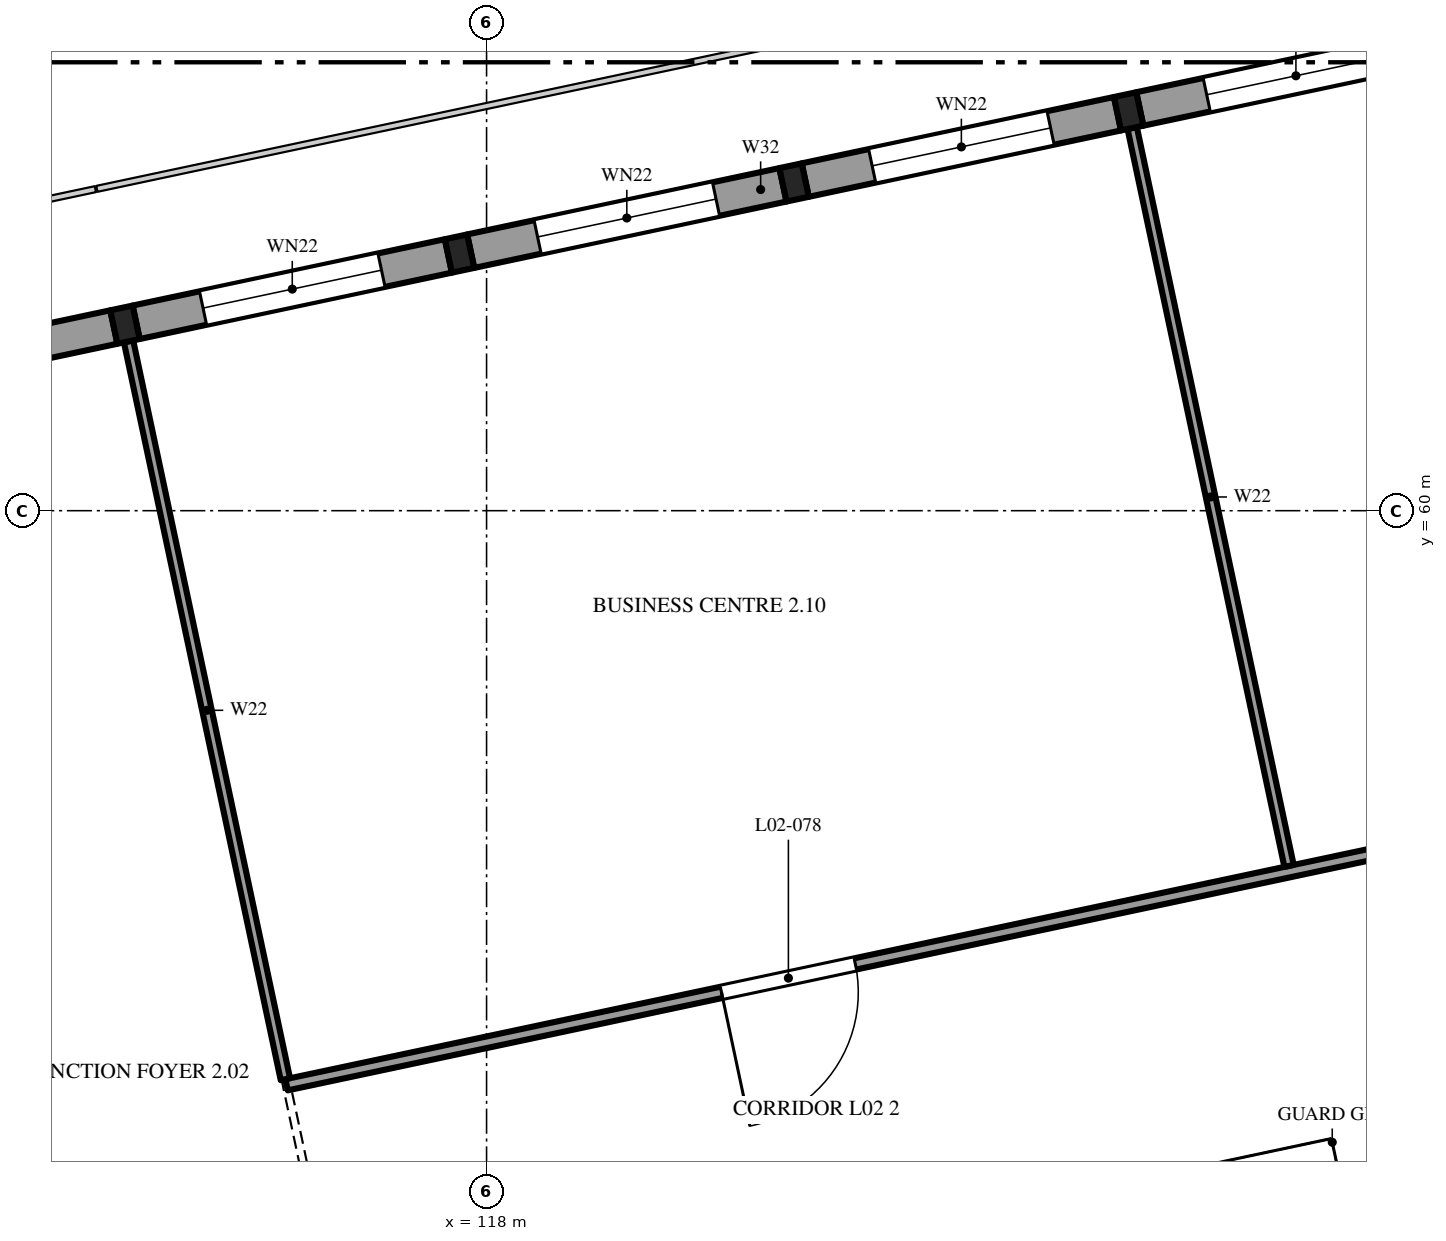
"""IFC4 building model, lengths in metres.
Left out: names, types, materials, properties, quantities, classifications, styles, units other than length and angle.
Written with IfcOpenShell. Run it as: python <this file> out.ifc"""

import sys

from ifc_helpers import new_model, si_unit, direction, frame, frame_2d, origin, origin_2d, place, context, subcontext, project, spatial, rectangle, i_section, extrude, element, fill, save


model = new_model("IFC4")
c1 = context("Model", 3, precision=1e-05, world=origin(), true_north=direction((0.0, 1.0)))
c2 = subcontext(c1, "Body", "Model", "MODEL_VIEW")
j1 = project(units=[si_unit("LENGTHUNIT", "METRE"), si_unit("PLANEANGLEUNIT", "RADIAN")], contexts=[c1])
p1 = place(None, origin())
s1 = spatial("IfcSite", under=j1, at=p1, CompositionType="ELEMENT")
p2 = place(p1, origin())
s2 = spatial("IfcBuilding", under=s1, at=p2, CompositionType="ELEMENT")
p3 = place(p2, frame((0.0, 0.0, 12.0)))
s3 = spatial("IfcBuildingStorey", under=s2, at=p3, CompositionType="ELEMENT", Elevation=12.0)
for number, where, z_axis, x_axis in (
    (1, (113.243, 62.448, 0.0), (0.0, 0.0, 1.0), (0.978, 0.208, 0.0)),
    (2, (117.645, 63.383, 0.0), (0.0, 0.0, 1.0), (0.978, 0.208, 0.0)),
    (3, (122.046, 64.319, 0.0), (0.0, 0.0, 1.0), (0.978, 0.208, 0.0)),
    (4, (126.448, 65.254, 0.0), (0.0, 0.0, 1.0), (0.978, 0.208, 0.0)),
):
    element("IfcColumn", number, at=place(p3, frame(where, z_axis=z_axis, x_axis=x_axis)), inside=s3, PredefinedType="COLUMN", context=c2, shape_type="SweptSolid", body=[
        extrude(i_section(OverallWidth=0.3, OverallDepth=0.45, WebThickness=0.014, FlangeThickness=0.026, FilletRadius=0.027, at=origin_2d()), origin(), (0.0, 0.0, 1.0), 4.8),
    ])
p4 = place(p3, frame((108.988, 61.543, 0.0), z_axis=(0.0, 0.0, 1.0), x_axis=(0.978143927149, 0.207928972925, 0.0)))
e5 = element("IfcWall", 5, at=p4, inside=s3, PredefinedType="SOLIDWALL", context=c2, shape_type="SweptSolid", body=[
    extrude(rectangle(XDim=4.2, YDim=0.45, at=frame_2d((2.1, 0.0))), origin(), (0.0, 0.0, 1.0), 4.35),
])
p5 = place(p4, frame((0.9, 0.0, 0.45)))
e6 = element("IfcOpeningElement", 6, at=p5, cuts=e5, PredefinedType="OPENING", context=c2, shape_type="SweptSolid", body=[
    extrude(rectangle(XDim=2.4, YDim=3.3, at=frame_2d((1.2, 1.65))), frame((0.0, 0.235, 0.0), z_axis=(0.0, -1.0, 0.0), x_axis=(1.0, 0.0, 0.0)), (0.0, 0.0, 1.0), 0.47),
])
p6 = place(p3, frame((113.389, 62.479, 0.0), z_axis=(0.0, 0.0, 1.0), x_axis=(0.978146440129, 0.207917150959, 0.0)))
e7 = element("IfcWall", 7, at=p6, inside=s3, PredefinedType="SOLIDWALL", context=c2, shape_type="SweptSolid", body=[
    extrude(rectangle(XDim=4.2, YDim=0.45, at=frame_2d((2.1, 0.0))), origin(), (0.0, 0.0, 1.0), 4.35),
])
p7 = place(p6, frame((0.9, 0.0, 0.9)))
e8 = element("IfcOpeningElement", 8, at=p7, cuts=e7, PredefinedType="OPENING", context=c2, shape_type="SweptSolid", body=[
    extrude(rectangle(XDim=2.4, YDim=2.4, at=frame_2d((1.2, 1.2))), frame((0.0, 0.235, 0.0), z_axis=(0.0, -1.0, 0.0), x_axis=(1.0, 0.0, 0.0)), (0.0, 0.0, 1.0), 0.47),
])
p8 = place(p3, frame((117.791, 63.414, 0.0), z_axis=(0.0, 0.0, 1.0), x_axis=(0.978146440129, 0.207917150959, 0.0)))
e9 = element("IfcWall", 9, at=p8, inside=s3, PredefinedType="SOLIDWALL", context=c2, shape_type="SweptSolid", body=[
    extrude(rectangle(XDim=4.2, YDim=0.45, at=frame_2d((2.1, 0.0))), origin(), (0.0, 0.0, 1.0), 4.35),
])
p9 = place(p8, frame((0.9, 0.0, 0.9)))
e10 = element("IfcOpeningElement", 10, at=p9, cuts=e9, PredefinedType="OPENING", context=c2, shape_type="SweptSolid", body=[
    extrude(rectangle(XDim=2.4, YDim=2.4, at=frame_2d((1.2, 1.2))), frame((0.0, 0.235, 0.0), z_axis=(0.0, -1.0, 0.0), x_axis=(1.0, 0.0, 0.0)), (0.0, 0.0, 1.0), 0.47),
])
p10 = place(p3, frame((122.193, 64.35, 0.0), z_axis=(0.0, 0.0, 1.0), x_axis=(0.978155748334, 0.207873355681, 0.0)))
e11 = element("IfcWall", 11, at=p10, inside=s3, PredefinedType="SOLIDWALL", context=c2, shape_type="SweptSolid", body=[
    extrude(rectangle(XDim=4.2, YDim=0.45, at=frame_2d((2.1, 0.0))), origin(), (0.0, 0.0, 1.0), 4.35),
])
p11 = place(p10, frame((0.9, 0.0, 0.9)))
e12 = element("IfcOpeningElement", 12, at=p11, cuts=e11, PredefinedType="OPENING", context=c2, shape_type="SweptSolid", body=[
    extrude(rectangle(XDim=2.4, YDim=2.4, at=frame_2d((1.2, 1.2))), frame((0.0, 0.235, 0.0), z_axis=(0.0, -1.0, 0.0), x_axis=(1.0, 0.0, 0.0)), (0.0, 0.0, 1.0), 0.47),
])
p12 = place(p3, frame((126.594, 65.286, 0.0), z_axis=(0.0, 0.0, 1.0), x_axis=(0.978143927149, 0.207928972925, 0.0)))
e13 = element("IfcWall", 13, at=p12, inside=s3, PredefinedType="SOLIDWALL", context=c2, shape_type="SweptSolid", body=[
    extrude(rectangle(XDim=4.2, YDim=0.45, at=frame_2d((2.1, 0.0))), origin(), (0.0, 0.0, 1.0), 4.35),
])
p13 = place(p12, frame((0.9, 0.0, 0.9)))
e14 = element("IfcOpeningElement", 14, at=p13, cuts=e13, PredefinedType="OPENING", context=c2, shape_type="SweptSolid", body=[
    extrude(rectangle(XDim=2.4, YDim=2.4, at=frame_2d((1.2, 1.2))), frame((0.0, 0.235, 0.0), z_axis=(0.0, -1.0, 0.0), x_axis=(1.0, 0.0, 0.0)), (0.0, 0.0, 1.0), 0.47),
])
p14 = place(p3, frame((115.369, 52.446, 0.0), z_axis=(0.0, 0.0, 1.0), x_axis=(0.978147028863, 0.207914381239, 0.0)))
e15 = element("IfcWall", 15, at=p14, inside=s3, PredefinedType="PARTITIONING", context=c2, shape_type="SweptSolid", body=[
    extrude(rectangle(XDim=49.5, YDim=0.15, at=frame_2d((24.75, 0.0))), origin(), (0.0, 0.0, 1.0), 3.75),
])
p15 = place(p14, frame((5.85, 0.0, 0.0)))
e16 = element("IfcOpeningElement", 16, at=p15, cuts=e15, PredefinedType="OPENING", context=c2, shape_type="SweptSolid", body=[
    extrude(rectangle(XDim=1.8, YDim=2.1, at=frame_2d((0.9, 1.05))), frame((0.0, 0.085, 0.0), z_axis=(0.0, -1.0, 0.0), x_axis=(1.0, 0.0, 0.0)), (0.0, 0.0, 1.0), 0.17),
])
p16 = place(p14, frame((19.35, 0.0, 0.0)))
e17 = element("IfcOpeningElement", 17, at=p16, cuts=e15, PredefinedType="OPENING", context=c2, shape_type="SweptSolid", body=[
    extrude(rectangle(XDim=1.8, YDim=2.1, at=frame_2d((0.9, 1.05))), frame((0.0, 0.085, 0.0), z_axis=(0.0, -1.0, 0.0), x_axis=(1.0, 0.0, 0.0)), (0.0, 0.0, 1.0), 0.17),
])
p17 = place(p14, frame((28.8, 0.0, 0.0)))
e18 = element("IfcOpeningElement", 18, at=p17, cuts=e15, PredefinedType="OPENING", context=c2, shape_type="SweptSolid", body=[
    extrude(rectangle(XDim=0.9, YDim=2.1, at=frame_2d((0.45, 1.05))), frame((0.0, 0.085, 0.0), z_axis=(0.0, -1.0, 0.0), x_axis=(1.0, 0.0, 0.0)), (0.0, 0.0, 1.0), 0.17),
])
p18 = place(p14, frame((33.25, 0.0, 0.0)))
e19 = element("IfcOpeningElement", 19, at=p18, cuts=e15, PredefinedType="OPENING", context=c2, shape_type="SweptSolid", body=[
    extrude(rectangle(XDim=1.0, YDim=2.1, at=frame_2d((0.5, 1.05))), frame((0.0, 0.085, 0.0), z_axis=(0.0, -1.0, 0.0), x_axis=(1.0, 0.0, 0.0)), (0.0, 0.0, 1.0), 0.17),
])
p19 = place(p14, frame((41.7, 0.0, 0.0)))
e20 = element("IfcOpeningElement", 20, at=p19, cuts=e15, PredefinedType="OPENING", context=c2, shape_type="SweptSolid", body=[
    extrude(rectangle(XDim=2.1, YDim=2.4, at=frame_2d((1.05, 1.2))), frame((0.0, 0.085, 0.0), z_axis=(0.0, -1.0, 0.0), x_axis=(1.0, 0.0, 0.0)), (0.0, 0.0, 1.0), 0.17),
])
p20 = place(p3, frame((113.29, 62.228, 0.0), z_axis=(0.0, 0.0, 1.0), x_axis=(0.20790935802, -0.978148096582, 0.0)))
e21 = element("IfcWall", 21, at=p20, inside=s3, PredefinedType="PARTITIONING", context=c2, shape_type="SweptSolid", body=[
    extrude(rectangle(XDim=9.925, YDim=0.125, at=frame_2d((4.962, 0.0))), origin(), (0.0, 0.0, 1.0), 3.75),
])
p21 = place(p3, frame((126.495, 65.034, 0.0), z_axis=(0.0, 0.0, 1.0), x_axis=(0.207904355568, -0.978149159861, 0.0)))
e22 = element("IfcWall", 22, at=p21, inside=s3, PredefinedType="PARTITIONING", context=c2, shape_type="SweptSolid", body=[
    extrude(rectangle(XDim=9.925, YDim=0.125, at=frame_2d((4.962, 0.0))), origin(), (0.0, 0.0, 1.0), 3.75),
])
p22 = place(p7, origin())
e23 = element("IfcWindow", 23, at=p22, inside=s3, PartitioningType="SINGLE_PANEL", PredefinedType="WINDOW", context=c2, shape_type="SweptSolid", body=[
    extrude(rectangle(XDim=2.4, YDim=2.4, at=frame_2d((1.2, 1.2))), frame((0.0, 0.03, 0.0), z_axis=(0.0, -1.0, 0.0), x_axis=(1.0, 0.0, 0.0)), (0.0, 0.0, 1.0), 0.06),
])
fill(e8, e23)
p23 = place(p9, origin())
e24 = element("IfcWindow", 24, at=p23, inside=s3, PartitioningType="SINGLE_PANEL", PredefinedType="WINDOW", context=c2, shape_type="SweptSolid", body=[
    extrude(rectangle(XDim=2.4, YDim=2.4, at=frame_2d((1.2, 1.2))), frame((0.0, 0.03, 0.0), z_axis=(0.0, -1.0, 0.0), x_axis=(1.0, 0.0, 0.0)), (0.0, 0.0, 1.0), 0.06),
])
fill(e10, e24)
p24 = place(p11, origin())
e25 = element("IfcWindow", 25, at=p24, inside=s3, PartitioningType="SINGLE_PANEL", PredefinedType="WINDOW", context=c2, shape_type="SweptSolid", body=[
    extrude(rectangle(XDim=2.4, YDim=2.4, at=frame_2d((1.2, 1.2))), frame((0.0, 0.03, 0.0), z_axis=(0.0, -1.0, 0.0), x_axis=(1.0, 0.0, 0.0)), (0.0, 0.0, 1.0), 0.06),
])
fill(e12, e25)
p25 = place(p13, origin())
e26 = element("IfcWindow", 26, at=p25, inside=s3, PartitioningType="SINGLE_PANEL", PredefinedType="WINDOW", context=c2, shape_type="SweptSolid", body=[
    extrude(rectangle(XDim=2.4, YDim=2.4, at=frame_2d((1.2, 1.2))), frame((0.0, 0.03, 0.0), z_axis=(0.0, -1.0, 0.0), x_axis=(1.0, 0.0, 0.0)), (0.0, 0.0, 1.0), 0.06),
])
fill(e14, e26)
p26 = place(p15, frame((1.8, 0.0, 0.0), z_axis=(0.0, 0.0, 1.0), x_axis=(-1.0, 0.0, 0.0)))
e27 = element("IfcDoor", 27, at=p26, inside=s3, OperationType="DOUBLE_DOOR_SINGLE_SWING", PredefinedType="DOOR", context=c2, shape_type="SweptSolid", body=[
    extrude(rectangle(XDim=1.8, YDim=2.1, at=frame_2d((0.9, 1.05))), frame((0.0, 0.025, 0.0), z_axis=(0.0, -1.0, 0.0), x_axis=(1.0, 0.0, 0.0)), (0.0, 0.0, 1.0), 0.05),
])
fill(e16, e27)
save(model, sys.argv[1])
